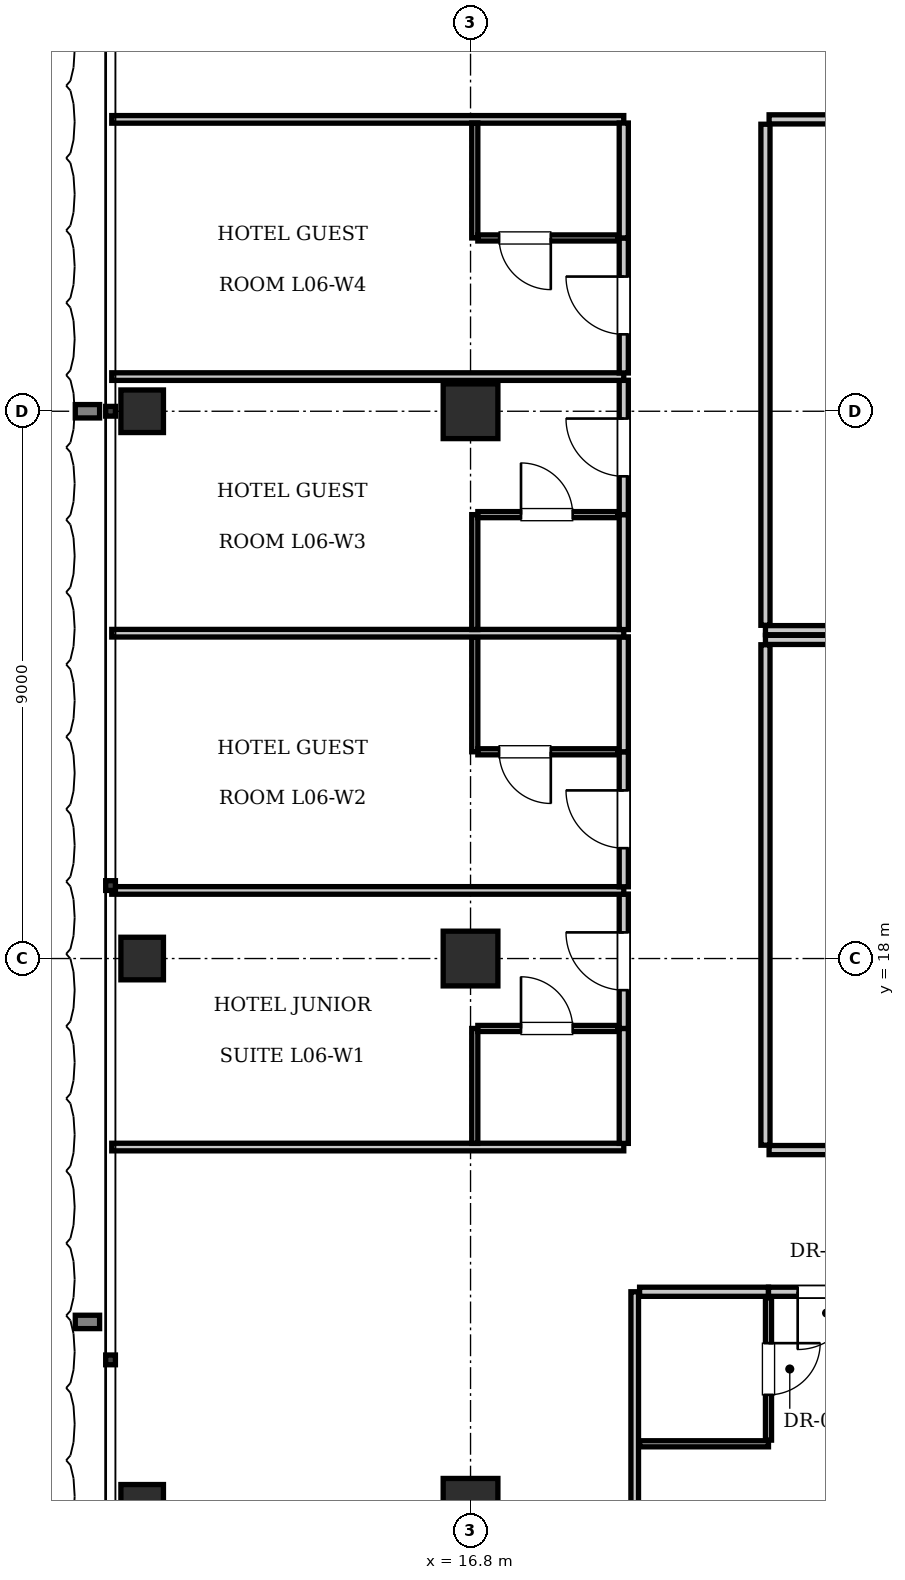
"""IFC4 building model, lengths in metres.
Left out: names, types, materials, properties, quantities, classifications, styles, units other than length and angle.
Written with IfcOpenShell. Run it as: python <this file> out.ifc"""

import sys

from ifc_helpers import new_model, si_unit, direction, frame, frame_2d, origin, origin_2d, place, context, subcontext, project, spatial, rectangle, i_section, extrude, element, fill, save


model = new_model("IFC4")
c1 = context("Model", 3, precision=1e-05, world=origin(), true_north=direction((0.0, 1.0)))
c2 = subcontext(c1, "Body", "Model", "MODEL_VIEW")
j1 = project(units=[si_unit("LENGTHUNIT", "METRE"), si_unit("PLANEANGLEUNIT", "RADIAN")], contexts=[c1])
p1 = place(None, origin())
s1 = spatial("IfcSite", under=j1, at=p1, CompositionType="ELEMENT")
p2 = place(p1, origin())
s2 = spatial("IfcBuilding", under=s1, at=p2, CompositionType="ELEMENT")
p3 = place(p2, frame((0.0, 0.0, 30.8)))
s3 = spatial("IfcBuildingStorey", under=s2, at=p3, CompositionType="ELEMENT", Elevation=30.8)
for number, where, z_axis, x_axis in (
    (1, (16.8, 9.0, 0.0), (0.0, 0.0, 1.0), (1.0, 0.0, 0.0)),
    (2, (16.8, 18.0, 0.0), (0.0, 0.0, 1.0), (1.0, 0.0, 0.0)),
    (3, (16.8, 27.0, 0.0), (0.0, 0.0, 1.0), (1.0, 0.0, 0.0)),
):
    element("IfcColumn", number, at=place(p3, frame(where, z_axis=z_axis, x_axis=x_axis)), inside=s3, PredefinedType="COLUMN", context=c2, shape_type="SweptSolid", body=[
        extrude(rectangle(XDim=0.9, YDim=0.9, at=origin_2d()), origin(), (0.0, 0.0, 1.0), 3.85),
    ])
for number, where, z_axis, x_axis in (
    (4, (11.4, 9.0, 0.0), (0.0, 0.0, 1.0), (1.0, 0.0, 0.0)),
    (5, (11.4, 18.0, 0.0), (0.0, 0.0, 1.0), (1.0, 0.0, 0.0)),
    (6, (11.4, 27.0, 0.0), (0.0, 0.0, 1.0), (1.0, 0.0, 0.0)),
):
    element("IfcColumn", number, at=place(p3, frame(where, z_axis=z_axis, x_axis=x_axis)), inside=s3, PredefinedType="COLUMN", context=c2, shape_type="SweptSolid", body=[
        extrude(i_section(OverallWidth=0.7, OverallDepth=0.7, WebThickness=0.028, FlangeThickness=0.044, at=origin_2d()), origin(), (0.0, 0.0, 1.0), 3.85),
    ])
p4 = place(p3, frame((21.65, 23.4, 0.0), z_axis=(0.0, 0.0, 1.0), x_axis=(1.0, 0.0, 0.0)))
e7 = element("IfcWall", 7, at=p4, inside=s3, PredefinedType="PARTITIONING", context=c2, shape_type="SweptSolid", body=[
    extrude(rectangle(XDim=32.3, YDim=0.15, at=frame_2d((16.15, 0.0))), origin(), (0.0, 0.0, 1.0), 3.61),
])
p5 = place(p3, frame((21.65, 23.48, 0.0), z_axis=(0.0, 0.0, 1.0), x_axis=(0.0, 1.0, 0.0)))
e8 = element("IfcWall", 8, at=p5, inside=s3, PredefinedType="PARTITIONING", context=c2, shape_type="SweptSolid", body=[
    extrude(rectangle(XDim=8.24, YDim=0.15, at=frame_2d((4.12, 0.0))), origin(), (0.0, 0.0, 1.0), 3.61),
])
p6 = place(p3, frame((21.71, 31.8, 0.0), z_axis=(0.0, 0.0, 1.0), x_axis=(1.0, 0.0, 0.0)))
e9 = element("IfcWall", 9, at=p6, inside=s3, PredefinedType="PARTITIONING", context=c2, shape_type="SweptSolid", body=[
    extrude(rectangle(XDim=5.078, YDim=0.15, at=frame_2d((2.539, 0.0))), origin(), (0.0, 0.0, 1.0), 3.61),
])
p7 = place(p6, frame((2.089, 0.0, 0.0)))
e10 = element("IfcOpeningElement", 10, at=p7, cuts=e9, PredefinedType="OPENING", context=c2, shape_type="SweptSolid", body=[
    extrude(rectangle(XDim=0.9, YDim=2.1, at=frame_2d((0.45, 1.05))), frame((0.0, 0.085, 0.0), z_axis=(0.0, -1.0, 0.0), x_axis=(1.0, 0.0, 0.0)), (0.0, 0.0, 1.0), 0.17),
])
p8 = place(p3, frame((21.65, 23.24, 0.0), z_axis=(0.0, 0.0, 1.0), x_axis=(1.0, 0.0, 0.0)))
e11 = element("IfcWall", 11, at=p8, inside=s3, PredefinedType="PARTITIONING", context=c2, shape_type="SweptSolid", body=[
    extrude(rectangle(XDim=32.3, YDim=0.15, at=frame_2d((16.15, 0.0))), origin(), (0.0, 0.0, 1.0), 3.61),
])
p9 = place(p3, frame((21.65, 14.93, 0.0), z_axis=(0.0, 0.0, 1.0), x_axis=(0.0, 1.0, 0.0)))
e12 = element("IfcWall", 12, at=p9, inside=s3, PredefinedType="PARTITIONING", context=c2, shape_type="SweptSolid", body=[
    extrude(rectangle(XDim=8.23, YDim=0.15, at=frame_2d((4.115, 0.0))), origin(), (0.0, 0.0, 1.0), 3.61),
])
p10 = place(p3, frame((21.71, 14.85, 0.0), z_axis=(0.0, 0.0, 1.0), x_axis=(1.0, 0.0, 0.0)))
e13 = element("IfcWall", 13, at=p10, inside=s3, PredefinedType="PARTITIONING", context=c2, shape_type="SweptSolid", body=[
    extrude(rectangle(XDim=11.861, YDim=0.15, at=frame_2d((5.931, 0.0))), origin(), (0.0, 0.0, 1.0), 3.61),
])
p11 = place(p10, frame((5.48, 0.0, 0.0)))
e14 = element("IfcOpeningElement", 14, at=p11, cuts=e13, PredefinedType="OPENING", context=c2, shape_type="SweptSolid", body=[
    extrude(rectangle(XDim=0.9, YDim=2.1, at=frame_2d((0.45, 1.05))), frame((0.0, 0.085, 0.0), z_axis=(0.0, -1.0, 0.0), x_axis=(1.0, 0.0, 0.0)), (0.0, 0.0, 1.0), 0.17),
])
p12 = place(p3, frame((19.5, 0.1, 0.0), z_axis=(0.0, 0.0, 1.0), x_axis=(0.0, 1.0, 0.0)))
e15 = element("IfcWall", 15, at=p12, inside=s3, PredefinedType="PARTITIONING", context=c2, shape_type="SweptSolid", body=[
    extrude(rectangle(XDim=12.42, YDim=0.125, at=frame_2d((6.21, 0.0))), origin(), (0.0, 0.0, 1.0), 3.61),
])
p13 = place(p3, frame((19.58, 12.52, 0.0), z_axis=(0.0, 0.0, 1.0), x_axis=(1.0, 0.0, 0.0)))
e16 = element("IfcWall", 16, at=p13, inside=s3, PredefinedType="PARTITIONING", context=c2, shape_type="SweptSolid", body=[
    extrude(rectangle(XDim=2.12, YDim=0.15, at=frame_2d((1.06, 0.0))), origin(), (0.0, 0.0, 1.0), 3.61),
])
p14 = place(p3, frame((19.58, 10.02, 0.0), z_axis=(0.0, 0.0, 1.0), x_axis=(1.0, 0.0, 0.0)))
e17 = element("IfcWall", 17, at=p14, inside=s3, PredefinedType="PARTITIONING", context=c2, shape_type="SweptSolid", body=[
    extrude(rectangle(XDim=2.12, YDim=0.1, at=frame_2d((1.06, 0.0))), origin(), (0.0, 0.0, 1.0), 3.61),
])
p15 = place(p3, frame((21.7, 10.08, 0.0), z_axis=(0.0, 0.0, 1.0), x_axis=(0.0, 1.0, 0.0)))
e18 = element("IfcWall", 18, at=p15, inside=s3, PredefinedType="PARTITIONING", context=c2, shape_type="SweptSolid", body=[
    extrude(rectangle(XDim=2.34, YDim=0.1, at=frame_2d((1.17, 0.0))), origin(), (0.0, 0.0, 1.0), 3.61),
])
p16 = place(p15, frame((0.745, 0.0, 0.0)))
e19 = element("IfcOpeningElement", 19, at=p16, cuts=e18, PredefinedType="OPENING", context=c2, shape_type="SweptSolid", body=[
    extrude(rectangle(XDim=0.85, YDim=2.1, at=frame_2d((0.425, 1.05))), frame((0.0, 0.06, 0.0), z_axis=(0.0, -1.0, 0.0), x_axis=(1.0, 0.0, 0.0)), (0.0, 0.0, 1.0), 0.12),
])
p17 = place(p3, frame((21.7, 12.52, 0.0), z_axis=(0.0, 0.0, 1.0), x_axis=(1.0, 0.0, 0.0)))
e20 = element("IfcWall", 20, at=p17, inside=s3, PredefinedType="PARTITIONING", context=c2, shape_type="SweptSolid", body=[
    extrude(rectangle(XDim=1.91, YDim=0.15, at=frame_2d((0.955, 0.0))), origin(), (0.0, 0.0, 1.0), 3.61),
])
p18 = place(p17, frame((0.48, 0.0, 0.0)))
e21 = element("IfcOpeningElement", 21, at=p18, cuts=e20, PredefinedType="OPENING", context=c2, shape_type="SweptSolid", body=[
    extrude(rectangle(XDim=0.95, YDim=2.15, at=frame_2d((0.475, 1.075))), frame((0.0, 0.085, 0.0), z_axis=(0.0, -1.0, 0.0), x_axis=(1.0, 0.0, 0.0)), (0.0, 0.0, 1.0), 0.17),
])
for number, where, z_axis, x_axis in (
    (22, (10.9, 14.9, 0.0), (0.0, 0.0, 1.0), (1.0, 0.0, 0.0)),
    (23, (10.9, 31.8, 0.0), (0.0, 0.0, 1.0), (1.0, 0.0, 0.0)),
):
    element("IfcWall", number, at=place(p3, frame(where, z_axis=z_axis, x_axis=x_axis)), inside=s3, PredefinedType="PARTITIONING", context=c2, shape_type="SweptSolid", body=[
        extrude(rectangle(XDim=8.42, YDim=0.125, at=frame_2d((4.21, 0.0))), origin(), (0.0, 0.0, 1.0), 3.61),
    ])
p19 = place(p3, frame((19.32, 14.96, 0.0), z_axis=(0.0, 0.0, 1.0), x_axis=(0.0, 1.0, 0.0)))
e24 = element("IfcWall", 24, at=p19, inside=s3, PredefinedType="PARTITIONING", context=c2, shape_type="SweptSolid", body=[
    extrude(rectangle(XDim=1.89, YDim=0.15, at=frame_2d((0.945, 0.0))), origin(), (0.0, 0.0, 1.0), 3.61),
])
p20 = place(p3, frame((19.32, 16.85, 0.0), z_axis=(0.0, 0.0, 1.0), x_axis=(0.0, 1.0, 0.0)))
e25 = element("IfcWall", 25, at=p20, inside=s3, PredefinedType="PARTITIONING", context=c2, shape_type="SweptSolid", body=[
    extrude(rectangle(XDim=2.21, YDim=0.15, at=frame_2d((1.105, 0.0))), origin(), (0.0, 0.0, 1.0), 3.61),
])
p21 = place(p20, frame((0.63, 0.0, 0.0)))
e26 = element("IfcOpeningElement", 26, at=p21, cuts=e25, PredefinedType="OPENING", context=c2, shape_type="SweptSolid", body=[
    extrude(rectangle(XDim=0.95, YDim=2.15, at=frame_2d((0.475, 1.075))), frame((0.0, 0.085, 0.0), z_axis=(0.0, -1.0, 0.0), x_axis=(1.0, 0.0, 0.0)), (0.0, 0.0, 1.0), 0.17),
])
p22 = place(p3, frame((16.87, 14.96, 0.0), z_axis=(0.0, 0.0, 1.0), x_axis=(0.0, 1.0, 0.0)))
e27 = element("IfcWall", 27, at=p22, inside=s3, PredefinedType="PARTITIONING", context=c2, shape_type="SweptSolid", body=[
    extrude(rectangle(XDim=1.89, YDim=0.1, at=frame_2d((0.945, 0.0))), origin(), (0.0, 0.0, 1.0), 2.975),
])
p23 = place(p3, frame((16.92, 16.85, 0.0), z_axis=(0.0, 0.0, 1.0), x_axis=(1.0, 0.0, 0.0)))
e28 = element("IfcWall", 28, at=p23, inside=s3, PredefinedType="PARTITIONING", context=c2, shape_type="SweptSolid", body=[
    extrude(rectangle(XDim=2.3, YDim=0.1, at=frame_2d((1.15, 0.0))), origin(), (0.0, 0.0, 1.0), 3.61),
])
p24 = place(p23, frame((0.71, 0.0, 0.0)))
e29 = element("IfcOpeningElement", 29, at=p24, cuts=e28, PredefinedType="OPENING", context=c2, shape_type="SweptSolid", body=[
    extrude(rectangle(XDim=0.85, YDim=2.1, at=frame_2d((0.425, 1.05))), frame((0.0, 0.06, 0.0), z_axis=(0.0, -1.0, 0.0), x_axis=(1.0, 0.0, 0.0)), (0.0, 0.0, 1.0), 0.12),
])
p25 = place(p3, frame((10.9, 19.12, 0.0), z_axis=(0.0, 0.0, 1.0), x_axis=(1.0, 0.0, 0.0)))
e30 = element("IfcWall", 30, at=p25, inside=s3, PredefinedType="PARTITIONING", context=c2, shape_type="SweptSolid", body=[
    extrude(rectangle(XDim=8.42, YDim=0.125, at=frame_2d((4.21, 0.0))), origin(), (0.0, 0.0, 1.0), 3.61),
])
p26 = place(p3, frame((19.32, 19.18, 0.0), z_axis=(0.0, 0.0, 1.0), x_axis=(0.0, 1.0, 0.0)))
e31 = element("IfcWall", 31, at=p26, inside=s3, PredefinedType="PARTITIONING", context=c2, shape_type="SweptSolid", body=[
    extrude(rectangle(XDim=2.22, YDim=0.15, at=frame_2d((1.11, 0.0))), origin(), (0.0, 0.0, 1.0), 3.61),
])
p27 = place(p26, frame((0.635, 0.0, 0.0)))
e32 = element("IfcOpeningElement", 32, at=p27, cuts=e31, PredefinedType="OPENING", context=c2, shape_type="SweptSolid", body=[
    extrude(rectangle(XDim=0.95, YDim=2.15, at=frame_2d((0.475, 1.075))), frame((0.0, 0.085, 0.0), z_axis=(0.0, -1.0, 0.0), x_axis=(1.0, 0.0, 0.0)), (0.0, 0.0, 1.0), 0.17),
])
p28 = place(p3, frame((19.32, 21.4, 0.0), z_axis=(0.0, 0.0, 1.0), x_axis=(0.0, 1.0, 0.0)))
e33 = element("IfcWall", 33, at=p28, inside=s3, PredefinedType="PARTITIONING", context=c2, shape_type="SweptSolid", body=[
    extrude(rectangle(XDim=1.89, YDim=0.15, at=frame_2d((0.945, 0.0))), origin(), (0.0, 0.0, 1.0), 3.61),
])
p29 = place(p3, frame((16.87, 21.4, 0.0), z_axis=(0.0, 0.0, 1.0), x_axis=(0.0, 1.0, 0.0)))
e34 = element("IfcWall", 34, at=p29, inside=s3, PredefinedType="PARTITIONING", context=c2, shape_type="SweptSolid", body=[
    extrude(rectangle(XDim=1.89, YDim=0.1, at=frame_2d((0.945, 0.0))), origin(), (0.0, 0.0, 1.0), 2.975),
])
p30 = place(p3, frame((16.92, 21.4, 0.0), z_axis=(0.0, 0.0, 1.0), x_axis=(1.0, 0.0, 0.0)))
e35 = element("IfcWall", 35, at=p30, inside=s3, PredefinedType="PARTITIONING", context=c2, shape_type="SweptSolid", body=[
    extrude(rectangle(XDim=2.3, YDim=0.1, at=frame_2d((1.15, 0.0))), origin(), (0.0, 0.0, 1.0), 3.61),
])
p31 = place(p30, frame((0.35, 0.0, 0.0)))
e36 = element("IfcOpeningElement", 36, at=p31, cuts=e35, PredefinedType="OPENING", context=c2, shape_type="SweptSolid", body=[
    extrude(rectangle(XDim=0.85, YDim=2.1, at=frame_2d((0.425, 1.05))), frame((0.0, 0.06, 0.0), z_axis=(0.0, -1.0, 0.0), x_axis=(1.0, 0.0, 0.0)), (0.0, 0.0, 1.0), 0.12),
])
p32 = place(p3, frame((10.9, 23.35, 0.0), z_axis=(0.0, 0.0, 1.0), x_axis=(1.0, 0.0, 0.0)))
e37 = element("IfcWall", 37, at=p32, inside=s3, PredefinedType="PARTITIONING", context=c2, shape_type="SweptSolid", body=[
    extrude(rectangle(XDim=8.42, YDim=0.125, at=frame_2d((4.21, 0.0))), origin(), (0.0, 0.0, 1.0), 3.61),
])
p33 = place(p3, frame((19.32, 23.41, 0.0), z_axis=(0.0, 0.0, 1.0), x_axis=(0.0, 1.0, 0.0)))
e38 = element("IfcWall", 38, at=p33, inside=s3, PredefinedType="PARTITIONING", context=c2, shape_type="SweptSolid", body=[
    extrude(rectangle(XDim=1.89, YDim=0.15, at=frame_2d((0.945, 0.0))), origin(), (0.0, 0.0, 1.0), 3.61),
])
p34 = place(p3, frame((19.32, 25.3, 0.0), z_axis=(0.0, 0.0, 1.0), x_axis=(0.0, 1.0, 0.0)))
e39 = element("IfcWall", 39, at=p34, inside=s3, PredefinedType="PARTITIONING", context=c2, shape_type="SweptSolid", body=[
    extrude(rectangle(XDim=2.21, YDim=0.15, at=frame_2d((1.105, 0.0))), origin(), (0.0, 0.0, 1.0), 3.61),
])
p35 = place(p34, frame((0.63, 0.0, 0.0)))
e40 = element("IfcOpeningElement", 40, at=p35, cuts=e39, PredefinedType="OPENING", context=c2, shape_type="SweptSolid", body=[
    extrude(rectangle(XDim=0.95, YDim=2.15, at=frame_2d((0.475, 1.075))), frame((0.0, 0.085, 0.0), z_axis=(0.0, -1.0, 0.0), x_axis=(1.0, 0.0, 0.0)), (0.0, 0.0, 1.0), 0.17),
])
p36 = place(p3, frame((16.87, 23.41, 0.0), z_axis=(0.0, 0.0, 1.0), x_axis=(0.0, 1.0, 0.0)))
e41 = element("IfcWall", 41, at=p36, inside=s3, PredefinedType="PARTITIONING", context=c2, shape_type="SweptSolid", body=[
    extrude(rectangle(XDim=1.89, YDim=0.1, at=frame_2d((0.945, 0.0))), origin(), (0.0, 0.0, 1.0), 2.975),
])
p37 = place(p3, frame((16.92, 25.3, 0.0), z_axis=(0.0, 0.0, 1.0), x_axis=(1.0, 0.0, 0.0)))
e42 = element("IfcWall", 42, at=p37, inside=s3, PredefinedType="PARTITIONING", context=c2, shape_type="SweptSolid", body=[
    extrude(rectangle(XDim=2.3, YDim=0.1, at=frame_2d((1.15, 0.0))), origin(), (0.0, 0.0, 1.0), 3.61),
])
p38 = place(p37, frame((0.71, 0.0, 0.0)))
e43 = element("IfcOpeningElement", 43, at=p38, cuts=e42, PredefinedType="OPENING", context=c2, shape_type="SweptSolid", body=[
    extrude(rectangle(XDim=0.85, YDim=2.1, at=frame_2d((0.425, 1.05))), frame((0.0, 0.06, 0.0), z_axis=(0.0, -1.0, 0.0), x_axis=(1.0, 0.0, 0.0)), (0.0, 0.0, 1.0), 0.12),
])
p39 = place(p3, frame((10.9, 27.57, 0.0), z_axis=(0.0, 0.0, 1.0), x_axis=(1.0, 0.0, 0.0)))
e44 = element("IfcWall", 44, at=p39, inside=s3, PredefinedType="PARTITIONING", context=c2, shape_type="SweptSolid", body=[
    extrude(rectangle(XDim=8.42, YDim=0.125, at=frame_2d((4.21, 0.0))), origin(), (0.0, 0.0, 1.0), 3.61),
])
p40 = place(p3, frame((19.32, 27.63, 0.0), z_axis=(0.0, 0.0, 1.0), x_axis=(0.0, 1.0, 0.0)))
e45 = element("IfcWall", 45, at=p40, inside=s3, PredefinedType="PARTITIONING", context=c2, shape_type="SweptSolid", body=[
    extrude(rectangle(XDim=2.22, YDim=0.15, at=frame_2d((1.11, 0.0))), origin(), (0.0, 0.0, 1.0), 3.61),
])
p41 = place(p40, frame((0.635, 0.0, 0.0)))
e46 = element("IfcOpeningElement", 46, at=p41, cuts=e45, PredefinedType="OPENING", context=c2, shape_type="SweptSolid", body=[
    extrude(rectangle(XDim=0.95, YDim=2.15, at=frame_2d((0.475, 1.075))), frame((0.0, 0.085, 0.0), z_axis=(0.0, -1.0, 0.0), x_axis=(1.0, 0.0, 0.0)), (0.0, 0.0, 1.0), 0.17),
])
p42 = place(p3, frame((19.32, 29.85, 0.0), z_axis=(0.0, 0.0, 1.0), x_axis=(0.0, 1.0, 0.0)))
e47 = element("IfcWall", 47, at=p42, inside=s3, PredefinedType="PARTITIONING", context=c2, shape_type="SweptSolid", body=[
    extrude(rectangle(XDim=1.89, YDim=0.15, at=frame_2d((0.945, 0.0))), origin(), (0.0, 0.0, 1.0), 3.61),
])
p43 = place(p3, frame((16.87, 29.85, 0.0), z_axis=(0.0, 0.0, 1.0), x_axis=(0.0, 1.0, 0.0)))
e48 = element("IfcWall", 48, at=p43, inside=s3, PredefinedType="PARTITIONING", context=c2, shape_type="SweptSolid", body=[
    extrude(rectangle(XDim=1.89, YDim=0.1, at=frame_2d((0.945, 0.0))), origin(), (0.0, 0.0, 1.0), 2.975),
])
p44 = place(p3, frame((16.92, 29.85, 0.0), z_axis=(0.0, 0.0, 1.0), x_axis=(1.0, 0.0, 0.0)))
e49 = element("IfcWall", 49, at=p44, inside=s3, PredefinedType="PARTITIONING", context=c2, shape_type="SweptSolid", body=[
    extrude(rectangle(XDim=2.3, YDim=0.1, at=frame_2d((1.15, 0.0))), origin(), (0.0, 0.0, 1.0), 3.61),
])
p45 = place(p44, frame((0.35, 0.0, 0.0)))
e50 = element("IfcOpeningElement", 50, at=p45, cuts=e49, PredefinedType="OPENING", context=c2, shape_type="SweptSolid", body=[
    extrude(rectangle(XDim=0.85, YDim=2.1, at=frame_2d((0.425, 1.05))), frame((0.0, 0.06, 0.0), z_axis=(0.0, -1.0, 0.0), x_axis=(1.0, 0.0, 0.0)), (0.0, 0.0, 1.0), 0.12),
])
p46 = place(p16, frame((0.85, 0.0, 0.0), z_axis=(0.0, 0.0, 1.0), x_axis=(-1.0, 0.0, 0.0)))
e51 = element("IfcDoor", 51, at=p46, inside=s3, OperationType="SINGLE_SWING_LEFT", PredefinedType="DOOR", context=c2, shape_type="SweptSolid", body=[
    extrude(rectangle(XDim=0.85, YDim=2.1, at=frame_2d((0.425, 1.05))), frame((0.0, 0.025, 0.0), z_axis=(0.0, -1.0, 0.0), x_axis=(1.0, 0.0, 0.0)), (0.0, 0.0, 1.0), 0.05),
])
fill(e19, e51)
p47 = place(p18, frame((0.95, 0.0, 0.0), z_axis=(0.0, 0.0, 1.0), x_axis=(-1.0, 0.0, 0.0)))
e52 = element("IfcDoor", 52, at=p47, inside=s3, OperationType="SINGLE_SWING_RIGHT", PredefinedType="DOOR", context=c2, shape_type="SweptSolid", body=[
    extrude(rectangle(XDim=0.95, YDim=2.15, at=frame_2d((0.475, 1.075))), frame((0.0, 0.025, 0.0), z_axis=(0.0, -1.0, 0.0), x_axis=(1.0, 0.0, 0.0)), (0.0, 0.0, 1.0), 0.05),
])
fill(e21, e52)
p48 = place(p24, origin())
e53 = element("IfcDoor", 53, at=p48, inside=s3, OperationType="SINGLE_SWING_LEFT", PredefinedType="DOOR", context=c2, shape_type="SweptSolid", body=[
    extrude(rectangle(XDim=0.85, YDim=2.1, at=frame_2d((0.425, 1.05))), frame((0.0, 0.025, 0.0), z_axis=(0.0, -1.0, 0.0), x_axis=(1.0, 0.0, 0.0)), (0.0, 0.0, 1.0), 0.05),
])
fill(e29, e53)
p49 = place(p21, origin())
e54 = element("IfcDoor", 54, at=p49, inside=s3, OperationType="SINGLE_SWING_RIGHT", PredefinedType="DOOR", context=c2, shape_type="SweptSolid", body=[
    extrude(rectangle(XDim=0.95, YDim=2.15, at=frame_2d((0.475, 1.075))), frame((0.0, 0.025, 0.0), z_axis=(0.0, -1.0, 0.0), x_axis=(1.0, 0.0, 0.0)), (0.0, 0.0, 1.0), 0.05),
])
fill(e26, e54)
p50 = place(p31, frame((0.85, 0.0, 0.0), z_axis=(0.0, 0.0, 1.0), x_axis=(-1.0, 0.0, 0.0)))
e55 = element("IfcDoor", 55, at=p50, inside=s3, OperationType="SINGLE_SWING_LEFT", PredefinedType="DOOR", context=c2, shape_type="SweptSolid", body=[
    extrude(rectangle(XDim=0.85, YDim=2.1, at=frame_2d((0.425, 1.05))), frame((0.0, 0.025, 0.0), z_axis=(0.0, -1.0, 0.0), x_axis=(1.0, 0.0, 0.0)), (0.0, 0.0, 1.0), 0.05),
])
fill(e36, e55)
p51 = place(p27, origin())
e56 = element("IfcDoor", 56, at=p51, inside=s3, OperationType="SINGLE_SWING_RIGHT", PredefinedType="DOOR", context=c2, shape_type="SweptSolid", body=[
    extrude(rectangle(XDim=0.95, YDim=2.15, at=frame_2d((0.475, 1.075))), frame((0.0, 0.025, 0.0), z_axis=(0.0, -1.0, 0.0), x_axis=(1.0, 0.0, 0.0)), (0.0, 0.0, 1.0), 0.05),
])
fill(e32, e56)
p52 = place(p38, origin())
e57 = element("IfcDoor", 57, at=p52, inside=s3, OperationType="SINGLE_SWING_LEFT", PredefinedType="DOOR", context=c2, shape_type="SweptSolid", body=[
    extrude(rectangle(XDim=0.85, YDim=2.1, at=frame_2d((0.425, 1.05))), frame((0.0, 0.025, 0.0), z_axis=(0.0, -1.0, 0.0), x_axis=(1.0, 0.0, 0.0)), (0.0, 0.0, 1.0), 0.05),
])
fill(e43, e57)
p53 = place(p35, origin())
e58 = element("IfcDoor", 58, at=p53, inside=s3, OperationType="SINGLE_SWING_RIGHT", PredefinedType="DOOR", context=c2, shape_type="SweptSolid", body=[
    extrude(rectangle(XDim=0.95, YDim=2.15, at=frame_2d((0.475, 1.075))), frame((0.0, 0.025, 0.0), z_axis=(0.0, -1.0, 0.0), x_axis=(1.0, 0.0, 0.0)), (0.0, 0.0, 1.0), 0.05),
])
fill(e40, e58)
p54 = place(p45, frame((0.85, 0.0, 0.0), z_axis=(0.0, 0.0, 1.0), x_axis=(-1.0, 0.0, 0.0)))
e59 = element("IfcDoor", 59, at=p54, inside=s3, OperationType="SINGLE_SWING_LEFT", PredefinedType="DOOR", context=c2, shape_type="SweptSolid", body=[
    extrude(rectangle(XDim=0.85, YDim=2.1, at=frame_2d((0.425, 1.05))), frame((0.0, 0.025, 0.0), z_axis=(0.0, -1.0, 0.0), x_axis=(1.0, 0.0, 0.0)), (0.0, 0.0, 1.0), 0.05),
])
fill(e50, e59)
p55 = place(p41, origin())
e60 = element("IfcDoor", 60, at=p55, inside=s3, OperationType="SINGLE_SWING_RIGHT", PredefinedType="DOOR", context=c2, shape_type="SweptSolid", body=[
    extrude(rectangle(XDim=0.95, YDim=2.15, at=frame_2d((0.475, 1.075))), frame((0.0, 0.025, 0.0), z_axis=(0.0, -1.0, 0.0), x_axis=(1.0, 0.0, 0.0)), (0.0, 0.0, 1.0), 0.05),
])
fill(e46, e60)
save(model, sys.argv[1])
